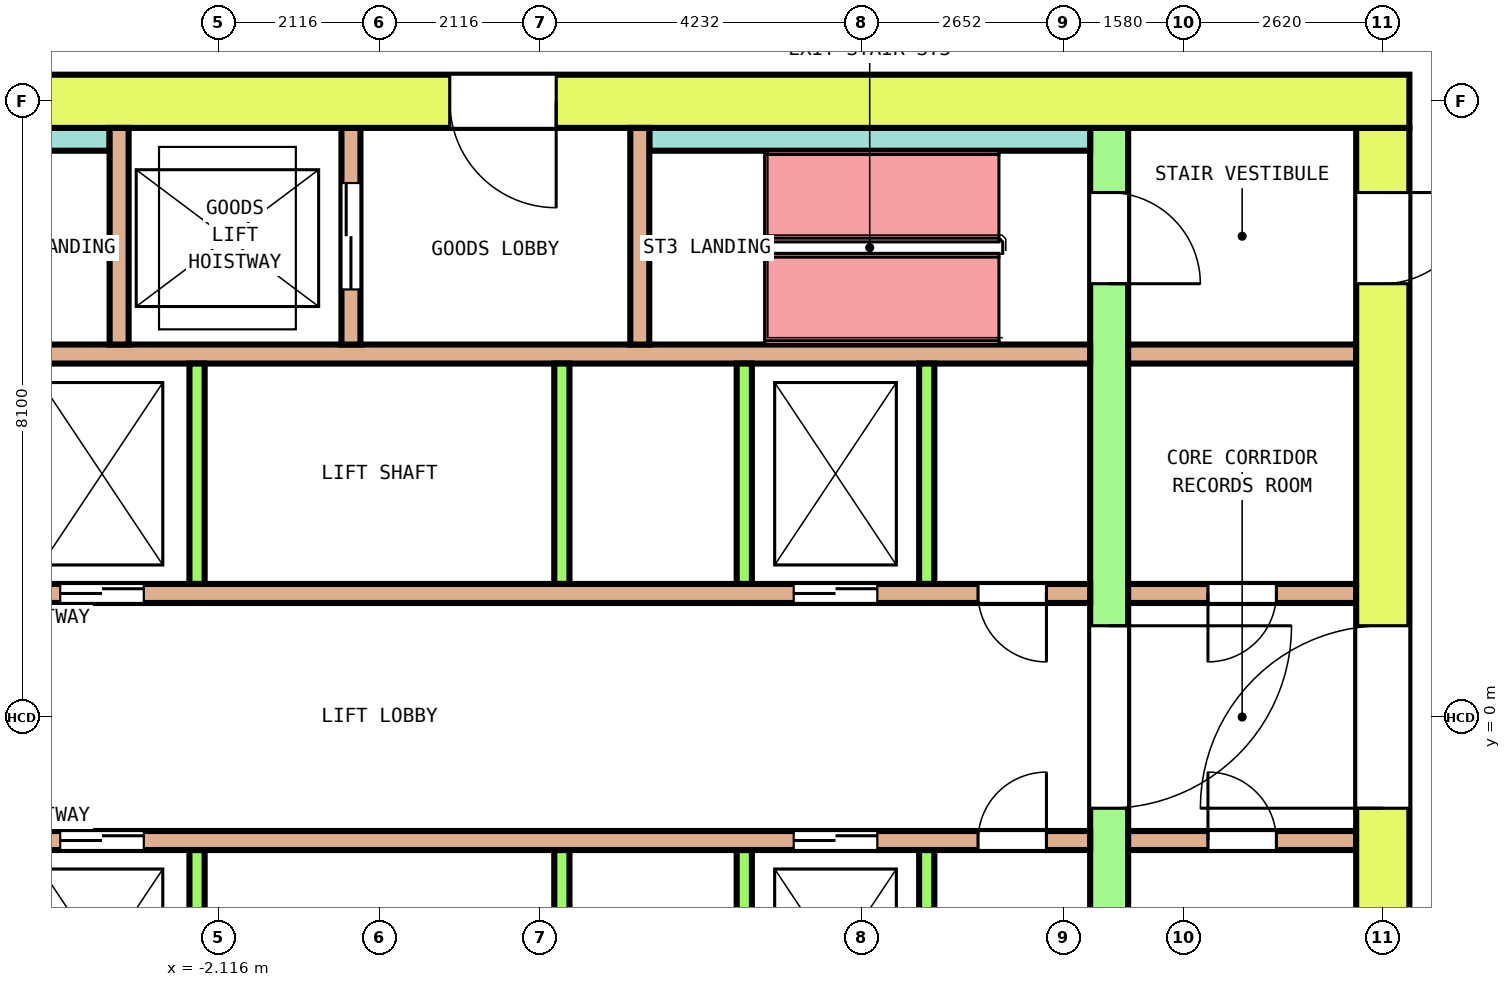
"""IFC4 building model, lengths in metres.
Left out: names, types, materials, properties, quantities, classifications, styles, units other than length and angle.
Written with IfcOpenShell. Run it as: python <this file> out.ifc"""

import sys

from ifc_helpers import new_model, si_unit, direction, frame, frame_2d, origin, place, context, subcontext, project, spatial, rectangle, extrude, element, fill, save


model = new_model("IFC4")
c1 = context("Model", 3, precision=1e-05, world=origin(), true_north=direction((0.0, 1.0)))
c2 = subcontext(c1, "Body", "Model", "MODEL_VIEW")
j1 = project(units=[si_unit("LENGTHUNIT", "METRE"), si_unit("PLANEANGLEUNIT", "RADIAN")], contexts=[c1])
p1 = place(None, origin())
s1 = spatial("IfcSite", under=j1, at=p1, CompositionType="ELEMENT")
p2 = place(p1, origin())
s2 = spatial("IfcBuilding", under=s1, at=p2, CompositionType="ELEMENT")
p3 = place(p2, frame((0.0, 0.0, 145.2)))
s3 = spatial("IfcBuildingStorey", under=s2, at=p3, CompositionType="ELEMENT", Elevation=145.2)
p4 = place(p3, frame((-13.55, 8.1, 0.0), z_axis=(0.0, 0.0, 1.0), x_axis=(1.0, 0.0, 0.0)))
e1 = element("IfcWall", 1, at=p4, inside=s3, PredefinedType="SHEAR", context=c2, shape_type="SweptSolid", body=[
    extrude(rectangle(XDim=27.1, YDim=0.7, at=frame_2d((13.55, 0.0))), origin(), (0.0, 0.0, 1.0), 4.1),
])
p5 = place(p4, frame((14.475, 0.0, 0.0)))
e2 = element("IfcOpeningElement", 2, at=p5, cuts=e1, PredefinedType="OPENING", context=c2, shape_type="SweptSolid", body=[
    extrude(rectangle(XDim=1.4, YDim=2.1, at=frame_2d((0.7, 1.05))), frame((0.0, 0.36, 0.0), z_axis=(0.0, -1.0, 0.0), x_axis=(1.0, 0.0, 0.0)), (0.0, 0.0, 1.0), 0.72),
])
p6 = place(p3, frame((13.2, -7.75, 0.0), z_axis=(0.0, 0.0, 1.0), x_axis=(0.0, 1.0, 0.0)))
e3 = element("IfcWall", 3, at=p6, inside=s3, PredefinedType="SHEAR", context=c2, shape_type="SweptSolid", body=[
    extrude(rectangle(XDim=15.5, YDim=0.7, at=frame_2d((7.75, 0.0))), origin(), (0.0, 0.0, 1.0), 4.1),
])
p7 = place(p6, frame((6.55, 0.0, 0.0)))
e4 = element("IfcOpeningElement", 4, at=p7, cuts=e3, PredefinedType="OPENING", context=c2, shape_type="SweptSolid", body=[
    extrude(rectangle(XDim=2.4, YDim=2.1, at=frame_2d((1.2, 1.05))), frame((0.0, 0.36, 0.0), z_axis=(0.0, -1.0, 0.0), x_axis=(1.0, 0.0, 0.0)), (0.0, 0.0, 1.0), 0.72),
])
p8 = place(p6, frame((13.45, 0.0, 0.0)))
e5 = element("IfcOpeningElement", 5, at=p8, cuts=e3, PredefinedType="OPENING", context=c2, shape_type="SweptSolid", body=[
    extrude(rectangle(XDim=1.2, YDim=2.1, at=frame_2d((0.6, 1.05))), frame((0.0, 0.36, 0.0), z_axis=(0.0, -1.0, 0.0), x_axis=(1.0, 0.0, 0.0)), (0.0, 0.0, 1.0), 0.72),
])
p9 = place(p6, frame((0.181, 0.0, 0.0)))
e6 = element("IfcOpeningElement", 6, at=p9, cuts=e3, PredefinedType="OPENING", context=c2, shape_type="SweptSolid", body=[
    extrude(rectangle(XDim=1.0, YDim=2.1, at=frame_2d((0.5, 1.05))), frame((0.0, 0.36, 0.0), z_axis=(0.0, -1.0, 0.0), x_axis=(1.0, 0.0, 0.0)), (0.0, 0.0, 1.0), 0.72),
])
p10 = place(p6, frame((1.669, 0.0, 0.0)))
e7 = element("IfcOpeningElement", 7, at=p10, cuts=e3, PredefinedType="OPENING", context=c2, shape_type="SweptSolid", body=[
    extrude(rectangle(XDim=1.0, YDim=2.1, at=frame_2d((0.5, 1.05))), frame((0.0, 0.36, 0.0), z_axis=(0.0, -1.0, 0.0), x_axis=(1.0, 0.0, 0.0)), (0.0, 0.0, 1.0), 0.72),
])
p11 = place(p3, frame((9.6, -7.75, 0.0), z_axis=(0.0, 0.0, 1.0), x_axis=(0.0, 1.0, 0.0)))
e8 = element("IfcWall", 8, at=p11, inside=s3, PredefinedType="SHEAR", context=c2, shape_type="SweptSolid", body=[
    extrude(rectangle(XDim=15.5, YDim=0.5, at=frame_2d((7.75, 0.0))), origin(), (0.0, 0.0, 1.0), 4.1),
])
p12 = place(p11, frame((6.55, 0.0, 0.0)))
e9 = element("IfcOpeningElement", 9, at=p12, cuts=e8, PredefinedType="OPENING", context=c2, shape_type="SweptSolid", body=[
    extrude(rectangle(XDim=2.4, YDim=2.1, at=frame_2d((1.2, 1.05))), frame((0.0, 0.26, 0.0), z_axis=(0.0, -1.0, 0.0), x_axis=(1.0, 0.0, 0.0)), (0.0, 0.0, 1.0), 0.52),
])
p13 = place(p11, frame((13.45, 0.0, 0.0)))
e10 = element("IfcOpeningElement", 10, at=p13, cuts=e8, PredefinedType="OPENING", context=c2, shape_type="SweptSolid", body=[
    extrude(rectangle(XDim=1.2, YDim=2.1, at=frame_2d((0.6, 1.05))), frame((0.0, 0.26, 0.0), z_axis=(0.0, -1.0, 0.0), x_axis=(1.0, 0.0, 0.0)), (0.0, 0.0, 1.0), 0.52),
])
p14 = place(p11, frame((0.95, 0.0, 0.0)))
e11 = element("IfcOpeningElement", 11, at=p14, cuts=e8, PredefinedType="OPENING", context=c2, shape_type="SweptSolid", body=[
    extrude(rectangle(XDim=1.0, YDim=2.1, at=frame_2d((0.5, 1.05))), frame((0.0, 0.26, 0.0), z_axis=(0.0, -1.0, 0.0), x_axis=(1.0, 0.0, 0.0)), (0.0, 0.0, 1.0), 0.52),
])
p15 = place(p3, frame((-9.35, 1.625, 0.0), z_axis=(0.0, 0.0, 1.0), x_axis=(1.0, 0.0, 0.0)))
e12 = element("IfcWall", 12, at=p15, inside=s3, PredefinedType="SOLIDWALL", context=c2, shape_type="SweptSolid", body=[
    extrude(rectangle(XDim=18.7, YDim=0.25, at=frame_2d((9.35, 0.0))), origin(), (0.0, 0.0, 1.0), 4.1),
])
p16 = place(p15, frame((2.85, 0.0, 0.0)))
e13 = element("IfcOpeningElement", 13, at=p16, cuts=e12, PredefinedType="OPENING", context=c2, shape_type="SweptSolid", body=[
    extrude(rectangle(XDim=1.1, YDim=2.1, at=frame_2d((0.55, 1.05))), frame((0.0, 0.135, 0.0), z_axis=(0.0, -1.0, 0.0), x_axis=(1.0, 0.0, 0.0)), (0.0, 0.0, 1.0), 0.27),
])
p17 = place(p15, frame((5.15, 0.0, 0.0)))
e14 = element("IfcOpeningElement", 14, at=p17, cuts=e12, PredefinedType="OPENING", context=c2, shape_type="SweptSolid", body=[
    extrude(rectangle(XDim=1.1, YDim=2.1, at=frame_2d((0.55, 1.05))), frame((0.0, 0.135, 0.0), z_axis=(0.0, -1.0, 0.0), x_axis=(1.0, 0.0, 0.0)), (0.0, 0.0, 1.0), 0.27),
])
p18 = place(p15, frame((14.8, 0.0, 0.0)))
e15 = element("IfcOpeningElement", 15, at=p18, cuts=e12, PredefinedType="OPENING", context=c2, shape_type="SweptSolid", body=[
    extrude(rectangle(XDim=1.1, YDim=2.1, at=frame_2d((0.55, 1.05))), frame((0.0, 0.135, 0.0), z_axis=(0.0, -1.0, 0.0), x_axis=(1.0, 0.0, 0.0)), (0.0, 0.0, 1.0), 0.27),
])
p19 = place(p15, frame((0.575, 0.0, 0.0)))
e16 = element("IfcOpeningElement", 16, at=p19, cuts=e12, PredefinedType="OPENING", context=c2, shape_type="SweptSolid", body=[
    extrude(rectangle(XDim=0.9, YDim=2.1, at=frame_2d((0.45, 1.05))), frame((0.0, 0.135, 0.0), z_axis=(0.0, -1.0, 0.0), x_axis=(1.0, 0.0, 0.0)), (0.0, 0.0, 1.0), 0.27),
])
p20 = place(p15, frame((17.225, 0.0, 0.0)))
e17 = element("IfcOpeningElement", 17, at=p20, cuts=e12, PredefinedType="OPENING", context=c2, shape_type="SweptSolid", body=[
    extrude(rectangle(XDim=0.9, YDim=2.1, at=frame_2d((0.45, 1.05))), frame((0.0, 0.135, 0.0), z_axis=(0.0, -1.0, 0.0), x_axis=(1.0, 0.0, 0.0)), (0.0, 0.0, 1.0), 0.27),
])
p21 = place(p3, frame((9.85, 1.625, 0.0), z_axis=(0.0, 0.0, 1.0), x_axis=(1.0, 0.0, 0.0)))
e18 = element("IfcWall", 18, at=p21, inside=s3, PredefinedType="SOLIDWALL", context=c2, shape_type="SweptSolid", body=[
    extrude(rectangle(XDim=3.0, YDim=0.25, at=frame_2d((1.5, 0.0))), origin(), (0.0, 0.0, 1.0), 4.1),
])
p22 = place(p21, frame((1.05, 0.0, 0.0)))
e19 = element("IfcOpeningElement", 19, at=p22, cuts=e18, PredefinedType="OPENING", context=c2, shape_type="SweptSolid", body=[
    extrude(rectangle(XDim=0.9, YDim=2.1, at=frame_2d((0.45, 1.05))), frame((0.0, 0.135, 0.0), z_axis=(0.0, -1.0, 0.0), x_axis=(1.0, 0.0, 0.0)), (0.0, 0.0, 1.0), 0.27),
])
p23 = place(p3, frame((-9.35, 4.775, 0.0), z_axis=(0.0, 0.0, 1.0), x_axis=(1.0, 0.0, 0.0)))
e20 = element("IfcWall", 20, at=p23, inside=s3, PredefinedType="SOLIDWALL", context=c2, shape_type="SweptSolid", body=[
    extrude(rectangle(XDim=18.7, YDim=0.25, at=frame_2d((9.35, 0.0))), origin(), (0.0, 0.0, 1.0), 4.1),
])
p24 = place(p3, frame((9.85, 4.775, 0.0), z_axis=(0.0, 0.0, 1.0), x_axis=(1.0, 0.0, 0.0)))
e21 = element("IfcWall", 21, at=p24, inside=s3, PredefinedType="SOLIDWALL", context=c2, shape_type="SweptSolid", body=[
    extrude(rectangle(XDim=3.0, YDim=0.25, at=frame_2d((1.5, 0.0))), origin(), (0.0, 0.0, 1.0), 4.1),
])
for number, where, z_axis, x_axis in (
    (22, (-2.4, 1.75, 0.0), (0.0, 0.0, 1.0), (0.0, 1.0, 0.0)),
    (23, (2.4, 1.75, 0.0), (0.0, 0.0, 1.0), (0.0, 1.0, 0.0)),
    (24, (4.8, 1.75, 0.0), (0.0, 0.0, 1.0), (0.0, 1.0, 0.0)),
    (25, (7.2, 1.75, 0.0), (0.0, 0.0, 1.0), (0.0, 1.0, 0.0)),
):
    element("IfcWall", number, at=place(p3, frame(where, z_axis=z_axis, x_axis=x_axis)), inside=s3, PredefinedType="SOLIDWALL", context=c2, shape_type="SweptSolid", body=[
        extrude(rectangle(XDim=2.9, YDim=0.2, at=frame_2d((1.45, 0.0))), origin(), (0.0, 0.0, 1.0), 4.1),
    ])
p25 = place(p3, frame((-9.35, -1.625, 0.0), z_axis=(0.0, 0.0, 1.0), x_axis=(1.0, 0.0, 0.0)))
e26 = element("IfcWall", 26, at=p25, inside=s3, PredefinedType="SOLIDWALL", context=c2, shape_type="SweptSolid", body=[
    extrude(rectangle(XDim=18.7, YDim=0.25, at=frame_2d((9.35, 0.0))), origin(), (0.0, 0.0, 1.0), 4.1),
])
p26 = place(p25, frame((2.85, 0.0, 0.0)))
e27 = element("IfcOpeningElement", 27, at=p26, cuts=e26, PredefinedType="OPENING", context=c2, shape_type="SweptSolid", body=[
    extrude(rectangle(XDim=1.1, YDim=2.1, at=frame_2d((0.55, 1.05))), frame((0.0, 0.135, 0.0), z_axis=(0.0, -1.0, 0.0), x_axis=(1.0, 0.0, 0.0)), (0.0, 0.0, 1.0), 0.27),
])
p27 = place(p25, frame((5.15, 0.0, 0.0)))
e28 = element("IfcOpeningElement", 28, at=p27, cuts=e26, PredefinedType="OPENING", context=c2, shape_type="SweptSolid", body=[
    extrude(rectangle(XDim=1.1, YDim=2.1, at=frame_2d((0.55, 1.05))), frame((0.0, 0.135, 0.0), z_axis=(0.0, -1.0, 0.0), x_axis=(1.0, 0.0, 0.0)), (0.0, 0.0, 1.0), 0.27),
])
p28 = place(p25, frame((14.8, 0.0, 0.0)))
e29 = element("IfcOpeningElement", 29, at=p28, cuts=e26, PredefinedType="OPENING", context=c2, shape_type="SweptSolid", body=[
    extrude(rectangle(XDim=1.1, YDim=2.1, at=frame_2d((0.55, 1.05))), frame((0.0, 0.135, 0.0), z_axis=(0.0, -1.0, 0.0), x_axis=(1.0, 0.0, 0.0)), (0.0, 0.0, 1.0), 0.27),
])
p29 = place(p25, frame((0.575, 0.0, 0.0)))
e30 = element("IfcOpeningElement", 30, at=p29, cuts=e26, PredefinedType="OPENING", context=c2, shape_type="SweptSolid", body=[
    extrude(rectangle(XDim=0.9, YDim=2.1, at=frame_2d((0.45, 1.05))), frame((0.0, 0.135, 0.0), z_axis=(0.0, -1.0, 0.0), x_axis=(1.0, 0.0, 0.0)), (0.0, 0.0, 1.0), 0.27),
])
p30 = place(p25, frame((17.225, 0.0, 0.0)))
e31 = element("IfcOpeningElement", 31, at=p30, cuts=e26, PredefinedType="OPENING", context=c2, shape_type="SweptSolid", body=[
    extrude(rectangle(XDim=0.9, YDim=2.1, at=frame_2d((0.45, 1.05))), frame((0.0, 0.135, 0.0), z_axis=(0.0, -1.0, 0.0), x_axis=(1.0, 0.0, 0.0)), (0.0, 0.0, 1.0), 0.27),
])
p31 = place(p3, frame((9.85, -1.625, 0.0), z_axis=(0.0, 0.0, 1.0), x_axis=(1.0, 0.0, 0.0)))
e32 = element("IfcWall", 32, at=p31, inside=s3, PredefinedType="SOLIDWALL", context=c2, shape_type="SweptSolid", body=[
    extrude(rectangle(XDim=3.0, YDim=0.25, at=frame_2d((1.5, 0.0))), origin(), (0.0, 0.0, 1.0), 4.1),
])
p32 = place(p31, frame((1.05, 0.0, 0.0)))
e33 = element("IfcOpeningElement", 33, at=p32, cuts=e32, PredefinedType="OPENING", context=c2, shape_type="SweptSolid", body=[
    extrude(rectangle(XDim=0.9, YDim=2.1, at=frame_2d((0.45, 1.05))), frame((0.0, 0.135, 0.0), z_axis=(0.0, -1.0, 0.0), x_axis=(1.0, 0.0, 0.0)), (0.0, 0.0, 1.0), 0.27),
])
for number, where, z_axis, x_axis in (
    (34, (-2.4, -4.65, 0.0), (0.0, 0.0, 1.0), (0.0, 1.0, 0.0)),
    (35, (2.4, -4.65, 0.0), (0.0, 0.0, 1.0), (0.0, 1.0, 0.0)),
    (36, (4.8, -4.65, 0.0), (0.0, 0.0, 1.0), (0.0, 1.0, 0.0)),
    (37, (7.2, -4.65, 0.0), (0.0, 0.0, 1.0), (0.0, 1.0, 0.0)),
):
    element("IfcWall", number, at=place(p3, frame(where, z_axis=z_axis, x_axis=x_axis)), inside=s3, PredefinedType="SOLIDWALL", context=c2, shape_type="SweptSolid", body=[
        extrude(rectangle(XDim=2.9, YDim=0.2, at=frame_2d((1.45, 0.0))), origin(), (0.0, 0.0, 1.0), 4.1),
    ])
for number, where, z_axis, x_axis in (
    (38, (-9.35, 7.6, 0.0), (0.0, 0.0, 1.0), (1.0, 0.0, 0.0)),
    (39, (3.55, 7.6, 0.0), (0.0, 0.0, 1.0), (1.0, 0.0, 0.0)),
):
    element("IfcWall", number, at=place(p3, frame(where, z_axis=z_axis, x_axis=x_axis)), inside=s3, PredefinedType="SOLIDWALL", context=c2, shape_type="SweptSolid", body=[
        extrude(rectangle(XDim=5.8, YDim=0.3, at=frame_2d((2.9, 0.0))), origin(), (0.0, 0.0, 1.0), 4.1),
    ])
p33 = place(p3, frame((-3.425, 4.9, 0.0), z_axis=(0.0, 0.0, 1.0), x_axis=(0.0, 1.0, 0.0)))
e40 = element("IfcWall", 40, at=p33, inside=s3, PredefinedType="SOLIDWALL", context=c2, shape_type="SweptSolid", body=[
    extrude(rectangle(XDim=2.85, YDim=0.25, at=frame_2d((1.425, 0.0))), origin(), (0.0, 0.0, 1.0), 4.1),
])
p34 = place(p3, frame((-0.375, 4.9, 0.0), z_axis=(0.0, 0.0, 1.0), x_axis=(0.0, 1.0, 0.0)))
e41 = element("IfcWall", 41, at=p34, inside=s3, PredefinedType="SOLIDWALL", context=c2, shape_type="SweptSolid", body=[
    extrude(rectangle(XDim=2.85, YDim=0.25, at=frame_2d((1.425, 0.0))), origin(), (0.0, 0.0, 1.0), 4.1),
])
p35 = place(p34, frame((0.725, 0.0, 0.0)))
e42 = element("IfcOpeningElement", 42, at=p35, cuts=e41, PredefinedType="OPENING", context=c2, shape_type="SweptSolid", body=[
    extrude(rectangle(XDim=1.4, YDim=2.1, at=frame_2d((0.7, 1.05))), frame((0.0, 0.135, 0.0), z_axis=(0.0, -1.0, 0.0), x_axis=(1.0, 0.0, 0.0)), (0.0, 0.0, 1.0), 0.27),
])
p36 = place(p3, frame((3.425, 4.9, 0.0), z_axis=(0.0, 0.0, 1.0), x_axis=(0.0, 1.0, 0.0)))
e43 = element("IfcWall", 43, at=p36, inside=s3, PredefinedType="SOLIDWALL", context=c2, shape_type="SweptSolid", body=[
    extrude(rectangle(XDim=2.85, YDim=0.25, at=frame_2d((1.425, 0.0))), origin(), (0.0, 0.0, 1.0), 4.1),
])
p37 = place(p17, origin())
e44 = element("IfcDoor", 44, at=p37, inside=s3, OperationType="DOUBLE_DOOR_SLIDING", PredefinedType="DOOR", context=c2, shape_type="SweptSolid", body=[
    extrude(rectangle(XDim=1.1, YDim=2.1, at=frame_2d((0.55, 1.05))), frame((0.0, 0.075, 0.0), z_axis=(0.0, -1.0, 0.0), x_axis=(1.0, 0.0, 0.0)), (0.0, 0.0, 1.0), 0.15),
])
fill(e14, e44)
p38 = place(p18, origin())
e45 = element("IfcDoor", 45, at=p38, inside=s3, OperationType="DOUBLE_DOOR_SLIDING", PredefinedType="DOOR", context=c2, shape_type="SweptSolid", body=[
    extrude(rectangle(XDim=1.1, YDim=2.1, at=frame_2d((0.55, 1.05))), frame((0.0, 0.075, 0.0), z_axis=(0.0, -1.0, 0.0), x_axis=(1.0, 0.0, 0.0)), (0.0, 0.0, 1.0), 0.15),
])
fill(e15, e45)
p39 = place(p27, origin())
e46 = element("IfcDoor", 46, at=p39, inside=s3, OperationType="DOUBLE_DOOR_SLIDING", PredefinedType="DOOR", context=c2, shape_type="SweptSolid", body=[
    extrude(rectangle(XDim=1.1, YDim=2.1, at=frame_2d((0.55, 1.05))), frame((0.0, 0.075, 0.0), z_axis=(0.0, -1.0, 0.0), x_axis=(1.0, 0.0, 0.0)), (0.0, 0.0, 1.0), 0.15),
])
fill(e28, e46)
p40 = place(p28, origin())
e47 = element("IfcDoor", 47, at=p40, inside=s3, OperationType="DOUBLE_DOOR_SLIDING", PredefinedType="DOOR", context=c2, shape_type="SweptSolid", body=[
    extrude(rectangle(XDim=1.1, YDim=2.1, at=frame_2d((0.55, 1.05))), frame((0.0, 0.075, 0.0), z_axis=(0.0, -1.0, 0.0), x_axis=(1.0, 0.0, 0.0)), (0.0, 0.0, 1.0), 0.15),
])
fill(e29, e47)
p41 = place(p35, origin())
e48 = element("IfcDoor", 48, at=p41, inside=s3, OperationType="DOUBLE_DOOR_SLIDING", PredefinedType="DOOR", context=c2, shape_type="SweptSolid", body=[
    extrude(rectangle(XDim=1.4, YDim=2.1, at=frame_2d((0.7, 1.05))), frame((0.0, 0.075, 0.0), z_axis=(0.0, -1.0, 0.0), x_axis=(1.0, 0.0, 0.0)), (0.0, 0.0, 1.0), 0.15),
])
fill(e42, e48)
p42 = place(p12, origin())
e49 = element("IfcDoor", 49, at=p42, inside=s3, OperationType="DOUBLE_DOOR_SINGLE_SWING", PredefinedType="DOOR", context=c2, shape_type="SweptSolid", body=[
    extrude(rectangle(XDim=2.4, YDim=2.1, at=frame_2d((1.2, 1.05))), frame((0.0, 0.2, 0.0), z_axis=(0.0, -1.0, 0.0), x_axis=(1.0, 0.0, 0.0)), (0.0, 0.0, 1.0), 0.4),
])
fill(e9, e49)
p43 = place(p7, origin())
e50 = element("IfcDoor", 50, at=p43, inside=s3, OperationType="DOUBLE_DOOR_SINGLE_SWING", PredefinedType="DOOR", context=c2, shape_type="SweptSolid", body=[
    extrude(rectangle(XDim=2.4, YDim=2.1, at=frame_2d((1.2, 1.05))), frame((0.0, 0.3, 0.0), z_axis=(0.0, -1.0, 0.0), x_axis=(1.0, 0.0, 0.0)), (0.0, 0.0, 1.0), 0.6),
])
fill(e4, e50)
p44 = place(p13, origin())
e51 = element("IfcDoor", 51, at=p44, inside=s3, OperationType="SINGLE_SWING_RIGHT", PredefinedType="DOOR", context=c2, shape_type="SweptSolid", body=[
    extrude(rectangle(XDim=1.2, YDim=2.1, at=frame_2d((0.6, 1.05))), frame((0.0, 0.2, 0.0), z_axis=(0.0, -1.0, 0.0), x_axis=(1.0, 0.0, 0.0)), (0.0, 0.0, 1.0), 0.4),
])
fill(e10, e51)
p45 = place(p8, origin())
e52 = element("IfcDoor", 52, at=p45, inside=s3, OperationType="SINGLE_SWING_LEFT", PredefinedType="DOOR", context=c2, shape_type="SweptSolid", body=[
    extrude(rectangle(XDim=1.2, YDim=2.1, at=frame_2d((0.6, 1.05))), frame((0.0, 0.3, 0.0), z_axis=(0.0, -1.0, 0.0), x_axis=(1.0, 0.0, 0.0)), (0.0, 0.0, 1.0), 0.6),
])
fill(e5, e52)
p46 = place(p5, origin())
e53 = element("IfcDoor", 53, at=p46, inside=s3, OperationType="DOUBLE_DOOR_SINGLE_SWING", PredefinedType="DOOR", context=c2, shape_type="SweptSolid", body=[
    extrude(rectangle(XDim=1.4, YDim=2.1, at=frame_2d((0.7, 1.05))), frame((0.0, 0.3, 0.0), z_axis=(0.0, -1.0, 0.0), x_axis=(1.0, 0.0, 0.0)), (0.0, 0.0, 1.0), 0.6),
])
fill(e2, e53)
p47 = place(p20, origin())
e54 = element("IfcDoor", 54, at=p47, inside=s3, OperationType="SINGLE_SWING_RIGHT", PredefinedType="DOOR", context=c2, shape_type="SweptSolid", body=[
    extrude(rectangle(XDim=0.9, YDim=2.1, at=frame_2d((0.45, 1.05))), frame((0.0, 0.075, 0.0), z_axis=(0.0, -1.0, 0.0), x_axis=(1.0, 0.0, 0.0)), (0.0, 0.0, 1.0), 0.15),
])
fill(e17, e54)
p48 = place(p22, origin())
e55 = element("IfcDoor", 55, at=p48, inside=s3, OperationType="SINGLE_SWING_LEFT", PredefinedType="DOOR", context=c2, shape_type="SweptSolid", body=[
    extrude(rectangle(XDim=0.9, YDim=2.1, at=frame_2d((0.45, 1.05))), frame((0.0, 0.075, 0.0), z_axis=(0.0, -1.0, 0.0), x_axis=(1.0, 0.0, 0.0)), (0.0, 0.0, 1.0), 0.15),
])
fill(e19, e55)
p49 = place(p30, origin())
e56 = element("IfcDoor", 56, at=p49, inside=s3, OperationType="SINGLE_SWING_LEFT", PredefinedType="DOOR", context=c2, shape_type="SweptSolid", body=[
    extrude(rectangle(XDim=0.9, YDim=2.1, at=frame_2d((0.45, 1.05))), frame((0.0, 0.075, 0.0), z_axis=(0.0, -1.0, 0.0), x_axis=(1.0, 0.0, 0.0)), (0.0, 0.0, 1.0), 0.15),
])
fill(e31, e56)
p50 = place(p32, origin())
e57 = element("IfcDoor", 57, at=p50, inside=s3, OperationType="SINGLE_SWING_RIGHT", PredefinedType="DOOR", context=c2, shape_type="SweptSolid", body=[
    extrude(rectangle(XDim=0.9, YDim=2.1, at=frame_2d((0.45, 1.05))), frame((0.0, 0.075, 0.0), z_axis=(0.0, -1.0, 0.0), x_axis=(1.0, 0.0, 0.0)), (0.0, 0.0, 1.0), 0.15),
])
fill(e33, e57)
save(model, sys.argv[1])
